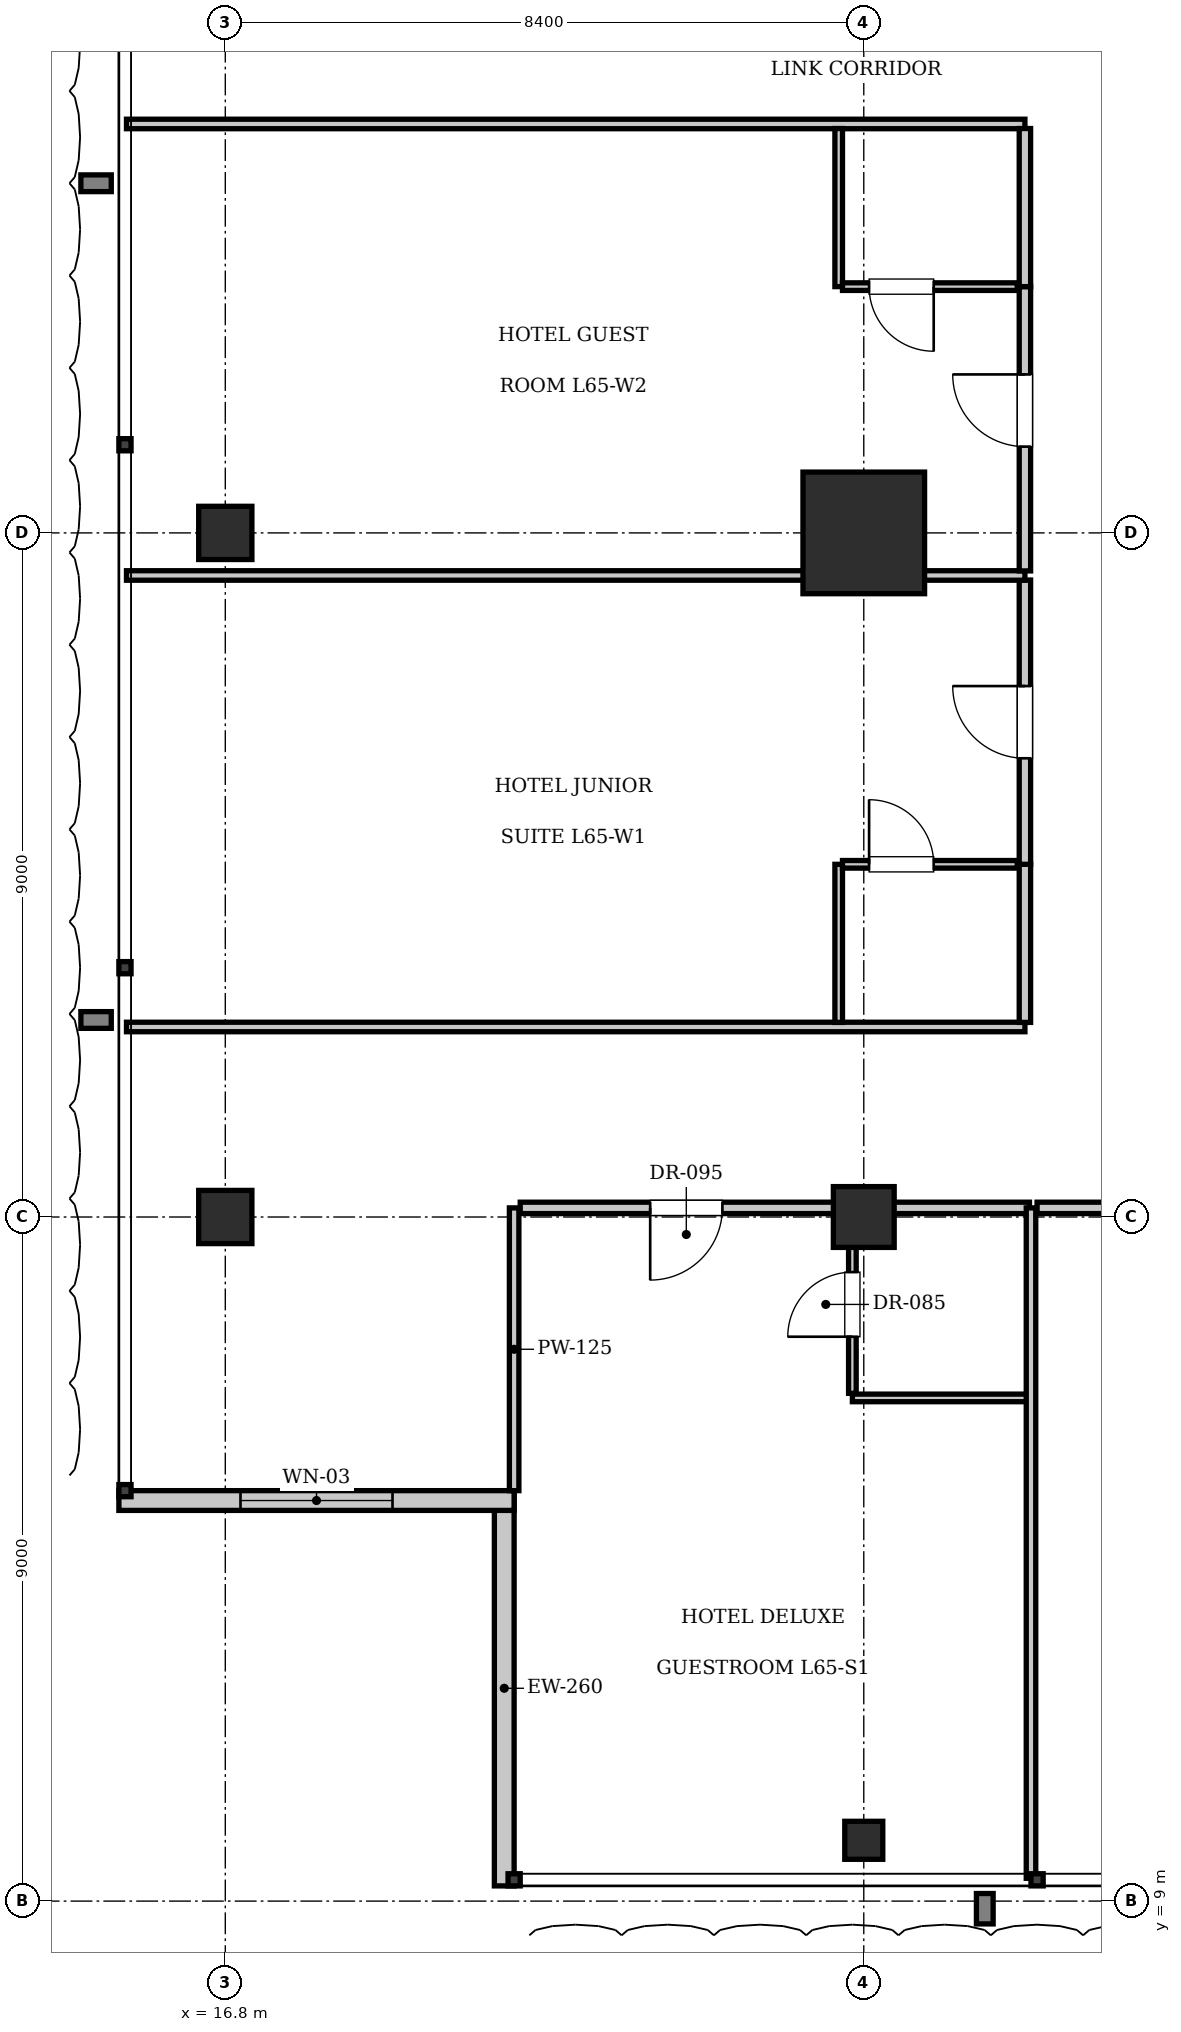
"""IFC4 building model, lengths in metres.
Left out: names, types, materials, properties, quantities, classifications, styles, units other than length and angle.
Written with IfcOpenShell. Run it as: python <this file> out.ifc"""

import sys

from ifc_helpers import new_model, si_unit, direction, frame, frame_2d, origin, origin_2d, place, context, subcontext, project, spatial, rectangle, i_section, extrude, element, fill, save


model = new_model("IFC4")
c1 = context("Model", 3, precision=1e-05, world=origin(), true_north=direction((0.0, 1.0)))
c2 = subcontext(c1, "Body", "Model", "MODEL_VIEW")
j1 = project(units=[si_unit("LENGTHUNIT", "METRE"), si_unit("PLANEANGLEUNIT", "RADIAN")], contexts=[c1])
p1 = place(None, origin())
s1 = spatial("IfcSite", under=j1, at=p1, CompositionType="ELEMENT")
p2 = place(p1, origin())
s2 = spatial("IfcBuilding", under=s1, at=p2, CompositionType="ELEMENT")
p3 = place(p2, frame((0.0, 0.0, 266.35)))
s3 = spatial("IfcBuildingStorey", under=s2, at=p3, CompositionType="ELEMENT", Elevation=266.35)
p4 = place(p3, frame((25.2, 27.0, 0.0), z_axis=(0.0, 0.0, 1.0), x_axis=(1.0, 0.0, 0.0)))
e1 = element("IfcColumn", 1, at=p4, inside=s3, PredefinedType="COLUMN", context=c2, shape_type="SweptSolid", body=[
    extrude(rectangle(XDim=1.6, YDim=1.6, at=origin_2d()), origin(), (0.0, 0.0, 1.0), 3.85),
])
p5 = place(p3, frame((25.2, 18.0, 0.0), z_axis=(0.0, 0.0, 1.0), x_axis=(1.0, 0.0, 0.0)))
e2 = element("IfcColumn", 2, at=p5, inside=s3, PredefinedType="COLUMN", context=c2, shape_type="SweptSolid", body=[
    extrude(rectangle(XDim=0.8, YDim=0.8, at=origin_2d()), origin(), (0.0, 0.0, 1.0), 3.85),
])
for number, where, z_axis, x_axis in (
    (3, (16.8, 18.0, 0.0), (0.0, 0.0, 1.0), (1.0, 0.0, 0.0)),
    (4, (16.8, 27.0, 0.0), (0.0, 0.0, 1.0), (1.0, 0.0, 0.0)),
):
    element("IfcColumn", number, at=place(p3, frame(where, z_axis=z_axis, x_axis=x_axis)), inside=s3, PredefinedType="COLUMN", context=c2, shape_type="SweptSolid", body=[
        extrude(rectangle(XDim=0.7, YDim=0.7, at=origin_2d()), origin(), (0.0, 0.0, 1.0), 3.85),
    ])
p6 = place(p3, frame((25.2, 9.8, 0.0), z_axis=(0.0, 0.0, 1.0), x_axis=(1.0, 0.0, 0.0)))
e5 = element("IfcColumn", 5, at=p6, inside=s3, PredefinedType="COLUMN", context=c2, shape_type="SweptSolid", body=[
    extrude(i_section(OverallWidth=0.5, OverallDepth=0.5, WebThickness=0.022, FlangeThickness=0.032, at=origin_2d()), origin(), (0.0, 0.0, 1.0), 3.85),
])
p7 = place(p3, frame((20.47, 9.2, 0.0), z_axis=(0.0, 0.0, 1.0), x_axis=(0.0, 1.0, 0.0)))
e6 = element("IfcWall", 6, at=p7, inside=s3, PredefinedType="SOLIDWALL", context=c2, shape_type="SweptSolid", body=[
    extrude(rectangle(XDim=5.2, YDim=0.26, at=frame_2d((2.6, 0.0))), origin(), (0.0, 0.0, 1.0), 3.61),
])
p8 = place(p3, frame((20.6, 14.27, 0.0), z_axis=(0.0, 0.0, 1.0), x_axis=(-1.0, 0.0, 0.0)))
e7 = element("IfcWall", 7, at=p8, inside=s3, PredefinedType="SOLIDWALL", context=c2, shape_type="SweptSolid", body=[
    extrude(rectangle(XDim=5.2, YDim=0.26, at=frame_2d((2.6, 0.0))), origin(), (0.0, 0.0, 1.0), 3.61),
])
p9 = place(p8, frame((1.6, 0.0, 0.9)))
e8 = element("IfcOpeningElement", 8, at=p9, cuts=e7, PredefinedType="OPENING", context=c2, shape_type="SweptSolid", body=[
    extrude(rectangle(XDim=2.0, YDim=2.2, at=frame_2d((1.0, 1.1))), frame((0.0, 0.14, 0.0), z_axis=(0.0, -1.0, 0.0), x_axis=(1.0, 0.0, 0.0)), (0.0, 0.0, 1.0), 0.28),
])
p10 = place(p3, frame((20.6, 14.4, 0.0), z_axis=(0.0, 0.0, 1.0), x_axis=(0.0, 1.0, 0.0)))
e9 = element("IfcWall", 9, at=p10, inside=s3, PredefinedType="PARTITIONING", context=c2, shape_type="SweptSolid", body=[
    extrude(rectangle(XDim=3.72, YDim=0.125, at=frame_2d((1.86, 0.0))), origin(), (0.0, 0.0, 1.0), 3.61),
])
p11 = place(p3, frame((25.05, 18.12, 0.0), z_axis=(0.0, 0.0, 1.0), x_axis=(1.0, 0.0, 0.0)))
e10 = element("IfcWall", 10, at=p11, inside=s3, PredefinedType="PARTITIONING", context=c2, shape_type="SweptSolid", body=[
    extrude(rectangle(XDim=2.33, YDim=0.15, at=frame_2d((1.165, 0.0))), origin(), (0.0, 0.0, 1.0), 3.077),
])
p12 = place(p3, frame((25.05, 15.62, 0.0), z_axis=(0.0, 0.0, 1.0), x_axis=(1.0, 0.0, 0.0)))
e11 = element("IfcWall", 11, at=p12, inside=s3, PredefinedType="PARTITIONING", context=c2, shape_type="SweptSolid", body=[
    extrude(rectangle(XDim=2.31, YDim=0.1, at=frame_2d((1.155, 0.0))), origin(), (0.0, 0.0, 1.0), 3.61),
])
p13 = place(p3, frame((25.05, 15.68, 0.0), z_axis=(0.0, 0.0, 1.0), x_axis=(0.0, 1.0, 0.0)))
e12 = element("IfcWall", 12, at=p13, inside=s3, PredefinedType="PARTITIONING", context=c2, shape_type="SweptSolid", body=[
    extrude(rectangle(XDim=2.34, YDim=0.1, at=frame_2d((1.17, 0.0))), origin(), (0.0, 0.0, 1.0), 3.61),
])
p14 = place(p13, frame((0.745, 0.0, 0.0)))
e13 = element("IfcOpeningElement", 13, at=p14, cuts=e12, PredefinedType="OPENING", context=c2, shape_type="SweptSolid", body=[
    extrude(rectangle(XDim=0.85, YDim=2.1, at=frame_2d((0.425, 1.05))), frame((0.0, 0.06, 0.0), z_axis=(0.0, -1.0, 0.0), x_axis=(1.0, 0.0, 0.0)), (0.0, 0.0, 1.0), 0.12),
])
p15 = place(p3, frame((20.68, 18.12, 0.0), z_axis=(0.0, 0.0, 1.0), x_axis=(1.0, 0.0, 0.0)))
e14 = element("IfcWall", 14, at=p15, inside=s3, PredefinedType="PARTITIONING", context=c2, shape_type="SweptSolid", body=[
    extrude(rectangle(XDim=4.37, YDim=0.15, at=frame_2d((2.185, 0.0))), origin(), (0.0, 0.0, 1.0), 3.077),
])
p16 = place(p15, frame((1.71, 0.0, 0.0)))
e15 = element("IfcOpeningElement", 15, at=p16, cuts=e14, PredefinedType="OPENING", context=c2, shape_type="SweptSolid", body=[
    extrude(rectangle(XDim=0.95, YDim=2.15, at=frame_2d((0.475, 1.075))), frame((0.0, 0.085, 0.0), z_axis=(0.0, -1.0, 0.0), x_axis=(1.0, 0.0, 0.0)), (0.0, 0.0, 1.0), 0.17),
])
p17 = place(p3, frame((27.4, 9.3, 0.0), z_axis=(0.0, 0.0, 1.0), x_axis=(0.0, 1.0, 0.0)))
e16 = element("IfcWall", 16, at=p17, inside=s3, PredefinedType="PARTITIONING", context=c2, shape_type="SweptSolid", body=[
    extrude(rectangle(XDim=8.82, YDim=0.125, at=frame_2d((4.41, 0.0))), origin(), (0.0, 0.0, 1.0), 3.61),
])
p18 = place(p3, frame((27.48, 18.12, 0.0), z_axis=(0.0, 0.0, 1.0), x_axis=(1.0, 0.0, 0.0)))
e17 = element("IfcWall", 17, at=p18, inside=s3, PredefinedType="PARTITIONING", context=c2, shape_type="SweptSolid", body=[
    extrude(rectangle(XDim=4.47, YDim=0.15, at=frame_2d((2.235, 0.0))), origin(), (0.0, 0.0, 1.0), 3.077),
])
p19 = place(p18, frame((1.76, 0.0, 0.0)))
e18 = element("IfcOpeningElement", 18, at=p19, cuts=e17, PredefinedType="OPENING", context=c2, shape_type="SweptSolid", body=[
    extrude(rectangle(XDim=0.95, YDim=2.15, at=frame_2d((0.475, 1.075))), frame((0.0, 0.085, 0.0), z_axis=(0.0, -1.0, 0.0), x_axis=(1.0, 0.0, 0.0)), (0.0, 0.0, 1.0), 0.17),
])
for number, where, z_axis, x_axis in (
    (19, (15.5, 20.5, 0.0), (0.0, 0.0, 1.0), (1.0, 0.0, 0.0)),
    (20, (15.5, 32.38, 0.0), (0.0, 0.0, 1.0), (1.0, 0.0, 0.0)),
):
    element("IfcWall", number, at=place(p3, frame(where, z_axis=z_axis, x_axis=x_axis)), inside=s3, PredefinedType="PARTITIONING", context=c2, shape_type="SweptSolid", body=[
        extrude(rectangle(XDim=11.82, YDim=0.125, at=frame_2d((5.91, 0.0))), origin(), (0.0, 0.0, 1.0), 3.61),
    ])
p20 = place(p3, frame((27.32, 20.56, 0.0), z_axis=(0.0, 0.0, 1.0), x_axis=(0.0, 1.0, 0.0)))
e21 = element("IfcWall", 21, at=p20, inside=s3, PredefinedType="PARTITIONING", context=c2, shape_type="SweptSolid", body=[
    extrude(rectangle(XDim=2.08, YDim=0.15, at=frame_2d((1.04, 0.0))), origin(), (0.0, 0.0, 1.0), 3.61),
])
p21 = place(p3, frame((27.32, 22.64, 0.0), z_axis=(0.0, 0.0, 1.0), x_axis=(0.0, 1.0, 0.0)))
e22 = element("IfcWall", 22, at=p21, inside=s3, PredefinedType="PARTITIONING", context=c2, shape_type="SweptSolid", body=[
    extrude(rectangle(XDim=3.74, YDim=0.15, at=frame_2d((1.87, 0.0))), origin(), (0.0, 0.0, 1.0), 3.61),
])
p22 = place(p21, frame((1.395, 0.0, 0.0)))
e23 = element("IfcOpeningElement", 23, at=p22, cuts=e22, PredefinedType="OPENING", context=c2, shape_type="SweptSolid", body=[
    extrude(rectangle(XDim=0.95, YDim=2.15, at=frame_2d((0.475, 1.075))), frame((0.0, 0.085, 0.0), z_axis=(0.0, -1.0, 0.0), x_axis=(1.0, 0.0, 0.0)), (0.0, 0.0, 1.0), 0.17),
])
p23 = place(p3, frame((24.87, 20.56, 0.0), z_axis=(0.0, 0.0, 1.0), x_axis=(0.0, 1.0, 0.0)))
e24 = element("IfcWall", 24, at=p23, inside=s3, PredefinedType="PARTITIONING", context=c2, shape_type="SweptSolid", body=[
    extrude(rectangle(XDim=2.08, YDim=0.1, at=frame_2d((1.04, 0.0))), origin(), (0.0, 0.0, 1.0), 3.61),
])
p24 = place(p3, frame((24.92, 22.64, 0.0), z_axis=(0.0, 0.0, 1.0), x_axis=(1.0, 0.0, 0.0)))
e25 = element("IfcWall", 25, at=p24, inside=s3, PredefinedType="PARTITIONING", context=c2, shape_type="SweptSolid", body=[
    extrude(rectangle(XDim=2.3, YDim=0.1, at=frame_2d((1.15, 0.0))), origin(), (0.0, 0.0, 1.0), 3.61),
])
p25 = place(p24, frame((0.35, 0.0, 0.0)))
e26 = element("IfcOpeningElement", 26, at=p25, cuts=e25, PredefinedType="OPENING", context=c2, shape_type="SweptSolid", body=[
    extrude(rectangle(XDim=0.85, YDim=2.1, at=frame_2d((0.425, 1.05))), frame((0.0, 0.06, 0.0), z_axis=(0.0, -1.0, 0.0), x_axis=(1.0, 0.0, 0.0)), (0.0, 0.0, 1.0), 0.12),
])
p26 = place(p3, frame((15.5, 26.44, 0.0), z_axis=(0.0, 0.0, 1.0), x_axis=(1.0, 0.0, 0.0)))
e27 = element("IfcWall", 27, at=p26, inside=s3, PredefinedType="PARTITIONING", context=c2, shape_type="SweptSolid", body=[
    extrude(rectangle(XDim=11.82, YDim=0.125, at=frame_2d((5.91, 0.0))), origin(), (0.0, 0.0, 1.0), 3.61),
])
p27 = place(p3, frame((27.32, 26.5, 0.0), z_axis=(0.0, 0.0, 1.0), x_axis=(0.0, 1.0, 0.0)))
e28 = element("IfcWall", 28, at=p27, inside=s3, PredefinedType="PARTITIONING", context=c2, shape_type="SweptSolid", body=[
    extrude(rectangle(XDim=3.74, YDim=0.15, at=frame_2d((1.87, 0.0))), origin(), (0.0, 0.0, 1.0), 3.61),
])
p28 = place(p27, frame((1.635, 0.0, 0.0)))
e29 = element("IfcOpeningElement", 29, at=p28, cuts=e28, PredefinedType="OPENING", context=c2, shape_type="SweptSolid", body=[
    extrude(rectangle(XDim=0.95, YDim=2.15, at=frame_2d((0.475, 1.075))), frame((0.0, 0.085, 0.0), z_axis=(0.0, -1.0, 0.0), x_axis=(1.0, 0.0, 0.0)), (0.0, 0.0, 1.0), 0.17),
])
p29 = place(p3, frame((27.32, 30.24, 0.0), z_axis=(0.0, 0.0, 1.0), x_axis=(0.0, 1.0, 0.0)))
e30 = element("IfcWall", 30, at=p29, inside=s3, PredefinedType="PARTITIONING", context=c2, shape_type="SweptSolid", body=[
    extrude(rectangle(XDim=2.08, YDim=0.15, at=frame_2d((1.04, 0.0))), origin(), (0.0, 0.0, 1.0), 3.61),
])
p30 = place(p3, frame((24.87, 30.24, 0.0), z_axis=(0.0, 0.0, 1.0), x_axis=(0.0, 1.0, 0.0)))
e31 = element("IfcWall", 31, at=p30, inside=s3, PredefinedType="PARTITIONING", context=c2, shape_type="SweptSolid", body=[
    extrude(rectangle(XDim=2.08, YDim=0.1, at=frame_2d((1.04, 0.0))), origin(), (0.0, 0.0, 1.0), 3.61),
])
p31 = place(p3, frame((24.92, 30.24, 0.0), z_axis=(0.0, 0.0, 1.0), x_axis=(1.0, 0.0, 0.0)))
e32 = element("IfcWall", 32, at=p31, inside=s3, PredefinedType="PARTITIONING", context=c2, shape_type="SweptSolid", body=[
    extrude(rectangle(XDim=2.3, YDim=0.1, at=frame_2d((1.15, 0.0))), origin(), (0.0, 0.0, 1.0), 3.61),
])
p32 = place(p31, frame((0.35, 0.0, 0.0)))
e33 = element("IfcOpeningElement", 33, at=p32, cuts=e32, PredefinedType="OPENING", context=c2, shape_type="SweptSolid", body=[
    extrude(rectangle(XDim=0.85, YDim=2.1, at=frame_2d((0.425, 1.05))), frame((0.0, 0.06, 0.0), z_axis=(0.0, -1.0, 0.0), x_axis=(1.0, 0.0, 0.0)), (0.0, 0.0, 1.0), 0.12),
])
p33 = place(p9, origin())
e34 = element("IfcWindow", 34, at=p33, inside=s3, PartitioningType="SINGLE_PANEL", PredefinedType="WINDOW", context=c2, shape_type="SweptSolid", body=[
    extrude(rectangle(XDim=2.0, YDim=2.2, at=frame_2d((1.0, 1.1))), frame((0.0, 0.03, 0.0), z_axis=(0.0, -1.0, 0.0), x_axis=(1.0, 0.0, 0.0)), (0.0, 0.0, 1.0), 0.06),
])
fill(e8, e34)
p34 = place(p14, origin())
e35 = element("IfcDoor", 35, at=p34, inside=s3, OperationType="SINGLE_SWING_LEFT", PredefinedType="DOOR", context=c2, shape_type="SweptSolid", body=[
    extrude(rectangle(XDim=0.85, YDim=2.1, at=frame_2d((0.425, 1.05))), frame((0.0, 0.025, 0.0), z_axis=(0.0, -1.0, 0.0), x_axis=(1.0, 0.0, 0.0)), (0.0, 0.0, 1.0), 0.05),
])
fill(e13, e35)
p35 = place(p16, frame((0.95, 0.0, 0.0), z_axis=(0.0, 0.0, 1.0), x_axis=(-1.0, 0.0, 0.0)))
e36 = element("IfcDoor", 36, at=p35, inside=s3, OperationType="SINGLE_SWING_RIGHT", PredefinedType="DOOR", context=c2, shape_type="SweptSolid", body=[
    extrude(rectangle(XDim=0.95, YDim=2.15, at=frame_2d((0.475, 1.075))), frame((0.0, 0.025, 0.0), z_axis=(0.0, -1.0, 0.0), x_axis=(1.0, 0.0, 0.0)), (0.0, 0.0, 1.0), 0.05),
])
fill(e15, e36)
p36 = place(p25, origin())
e37 = element("IfcDoor", 37, at=p36, inside=s3, OperationType="SINGLE_SWING_LEFT", PredefinedType="DOOR", context=c2, shape_type="SweptSolid", body=[
    extrude(rectangle(XDim=0.85, YDim=2.1, at=frame_2d((0.425, 1.05))), frame((0.0, 0.025, 0.0), z_axis=(0.0, -1.0, 0.0), x_axis=(1.0, 0.0, 0.0)), (0.0, 0.0, 1.0), 0.05),
])
fill(e26, e37)
p37 = place(p22, origin())
e38 = element("IfcDoor", 38, at=p37, inside=s3, OperationType="SINGLE_SWING_RIGHT", PredefinedType="DOOR", context=c2, shape_type="SweptSolid", body=[
    extrude(rectangle(XDim=0.95, YDim=2.15, at=frame_2d((0.475, 1.075))), frame((0.0, 0.025, 0.0), z_axis=(0.0, -1.0, 0.0), x_axis=(1.0, 0.0, 0.0)), (0.0, 0.0, 1.0), 0.05),
])
fill(e23, e38)
p38 = place(p32, frame((0.85, 0.0, 0.0), z_axis=(0.0, 0.0, 1.0), x_axis=(-1.0, 0.0, 0.0)))
e39 = element("IfcDoor", 39, at=p38, inside=s3, OperationType="SINGLE_SWING_LEFT", PredefinedType="DOOR", context=c2, shape_type="SweptSolid", body=[
    extrude(rectangle(XDim=0.85, YDim=2.1, at=frame_2d((0.425, 1.05))), frame((0.0, 0.025, 0.0), z_axis=(0.0, -1.0, 0.0), x_axis=(1.0, 0.0, 0.0)), (0.0, 0.0, 1.0), 0.05),
])
fill(e33, e39)
p39 = place(p28, origin())
e40 = element("IfcDoor", 40, at=p39, inside=s3, OperationType="SINGLE_SWING_RIGHT", PredefinedType="DOOR", context=c2, shape_type="SweptSolid", body=[
    extrude(rectangle(XDim=0.95, YDim=2.15, at=frame_2d((0.475, 1.075))), frame((0.0, 0.025, 0.0), z_axis=(0.0, -1.0, 0.0), x_axis=(1.0, 0.0, 0.0)), (0.0, 0.0, 1.0), 0.05),
])
fill(e29, e40)
save(model, sys.argv[1])
